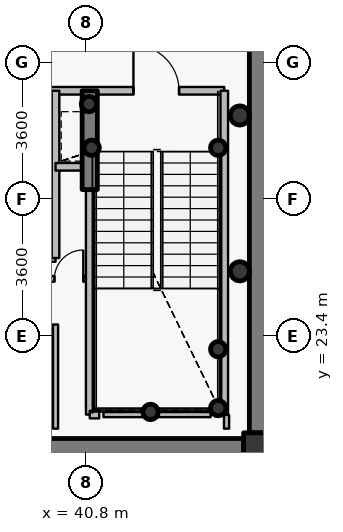
"""IFC4 building model, lengths in metres.
Left out: names, types, materials, properties, quantities, classifications, styles, units other than length and angle.
Written with IfcOpenShell. Run it as: python <this file> out.ifc"""

import sys

from ifc_helpers import new_model, si_unit, direction, frame, frame_2d, origin, origin_2d, place, context, subcontext, project, spatial, rectangle, hollow_circle, extrude, source, transform, mapped, element, fill, save


model = new_model("IFC4")
c1 = context("Model", 3, precision=1e-05, world=origin(), true_north=direction((0.0, 1.0)))
c2 = subcontext(c1, "Body", "Model", "MODEL_VIEW")
j1 = project(units=[si_unit("LENGTHUNIT", "METRE"), si_unit("PLANEANGLEUNIT", "RADIAN")], contexts=[c1])
p1 = place(None, origin())
s1 = spatial("IfcSite", under=j1, at=p1, CompositionType="ELEMENT")
p2 = place(p1, origin())
s2 = spatial("IfcBuilding", under=s1, at=p2, CompositionType="ELEMENT")
p3 = place(p2, frame((0.0, 0.0, 251.55)))
s3 = spatial("IfcBuildingStorey", under=s2, at=p3, CompositionType="ELEMENT", Elevation=251.55)
p4 = place(p3, frame((45.45, 20.35, 0.0), z_axis=(0.0, 0.0, 1.0), x_axis=(1.0, 0.0, 0.0)))
e1 = element("IfcColumn", 1, at=p4, inside=s3, PredefinedType="COLUMN", context=c2, shape_type="SweptSolid", body=[
    extrude(rectangle(XDim=1.0, YDim=1.0, at=origin_2d()), origin(), (0.0, 0.0, 1.0), 3.75),
])
for number, where, z_axis, x_axis in (
    (2, (44.28, 21.5, 0.0), (0.0, 0.0, 1.0), (1.0, 0.0, 0.0)),
    (3, (44.28, 23.05, 0.0), (0.0, 0.0, 1.0), (1.0, 0.0, 0.0)),
    (4, (42.5, 21.4, 0.0), (0.0, 0.0, 1.0), (1.0, 0.0, 0.0)),
    (5, (40.95, 28.35, 0.0), (0.0, 0.0, 1.0), (1.0, 0.0, 0.0)),
    (6, (44.28, 28.35, 0.0), (0.0, 0.0, 1.0), (1.0, 0.0, 0.0)),
    (7, (40.88, 29.5, 0.0), (0.0, 0.0, 1.0), (1.0, 0.0, 0.0)),
):
    element("IfcColumn", number, at=place(p3, frame(where, z_axis=z_axis, x_axis=x_axis)), inside=s3, PredefinedType="COLUMN", context=c2, shape_type="SweptSolid", body=[
        extrude(hollow_circle(Radius=0.203, WallThickness=0.016, at=origin_2d()), origin(), (0.0, 0.0, 1.0), 3.75),
    ])
p5 = place(p3, frame((45.45, 33.15, 0.0), z_axis=(0.0, 0.0, 1.0), x_axis=(0.0, -1.0, 0.0)))
e8 = element("IfcWall", 8, at=p5, inside=s3, PredefinedType="SHEAR", context=c2, shape_type="SweptSolid", body=[
    extrude(rectangle(XDim=12.3, YDim=0.7, at=frame_2d((6.15, 0.0))), origin(), (0.0, 0.0, 1.0), 3.05),
])
p6 = place(p3, frame((44.95, 20.35, 0.0), z_axis=(0.0, 0.0, 1.0), x_axis=(-1.0, 0.0, 0.0)))
e9 = element("IfcWall", 9, at=p6, inside=s3, PredefinedType="SHEAR", context=c2, shape_type="SweptSolid", body=[
    extrude(rectangle(XDim=17.9, YDim=0.7, at=frame_2d((8.95, 0.0))), origin(), (0.0, 0.0, 1.0), 3.05),
])
p7 = place(p6, frame((9.7, 0.0, 0.0)))
e10 = element("IfcOpeningElement", 10, at=p7, cuts=e9, PredefinedType="OPENING", context=c2, shape_type="SweptSolid", body=[
    extrude(rectangle(XDim=1.15, YDim=2.15, at=origin_2d()), frame((0.575, 0.36, 1.075), z_axis=(0.0, -1.0, 0.0), x_axis=(1.0, 0.0, 0.0)), (0.0, 0.0, 1.0), 0.72),
])
p8 = place(p3, frame((40.9, 27.25, 0.0), z_axis=(0.0, 0.0, 1.0), x_axis=(0.0, 1.0, 0.0)))
e11 = element("IfcWall", 11, at=p8, inside=s3, PredefinedType="SHEAR", context=c2, shape_type="SweptSolid", body=[
    extrude(rectangle(XDim=2.6, YDim=0.4, at=frame_2d((1.3, 0.0))), origin(), (0.0, 0.0, 1.0), 3.1),
])
for number, where, z_axis, x_axis in (
    (12, (44.85, 25.1, 0.0), (0.0, 0.0, 1.0), (1.0, 0.0, 0.0)),
    (13, (44.85, 29.2, 0.0), (0.0, 0.0, 1.0), (1.0, 0.0, 0.0)),
):
    element("IfcColumn", number, at=place(p3, frame(where, z_axis=z_axis, x_axis=x_axis)), inside=s3, PredefinedType="COLUMN", context=c2, shape_type="SweptSolid", body=[
        extrude(hollow_circle(Radius=0.254, WallThickness=0.02, at=origin_2d()), origin(), (0.0, 0.0, 1.0), 3.75),
    ])
p9 = place(p3, frame((35.05, 27.25, 0.0), z_axis=(0.0, 0.0, 1.0), x_axis=(1.0, 0.0, 0.0)))
e14 = element("IfcWall", 14, at=p9, inside=s3, PredefinedType="PARTITIONING", context=c2, shape_type="SweptSolid", body=[
    extrude(rectangle(XDim=4.95, YDim=0.2, at=frame_2d((2.475, 0.0))), origin(), (0.0, 0.0, 1.0), 3.085),
])
p10 = place(p3, frame((35.45, 25.45, 0.0), z_axis=(0.0, 0.0, 1.0), x_axis=(1.0, 0.0, 0.0)))
e15 = element("IfcWall", 15, at=p10, inside=s3, PredefinedType="PARTITIONING", context=c2, shape_type="SweptSolid", body=[
    extrude(rectangle(XDim=4.55, YDim=0.2, at=frame_2d((2.275, 0.0))), origin(), (0.0, 0.0, 1.0), 3.085),
])
p11 = place(p3, frame((35.95, 29.85, 0.0), z_axis=(0.0, 0.0, 1.0), x_axis=(1.0, 0.0, 0.0)))
e16 = element("IfcWall", 16, at=p11, inside=s3, PredefinedType="PARTITIONING", context=c2, shape_type="SweptSolid", body=[
    extrude(rectangle(XDim=8.49, YDim=0.2, at=frame_2d((4.245, 0.0))), origin(), (0.0, 0.0, 1.0), 3.085),
])
p12 = place(p11, frame((6.1, 0.0, 0.0)))
e17 = element("IfcOpeningElement", 17, at=p12, cuts=e16, PredefinedType="OPENING", context=c2, shape_type="SweptSolid", body=[
    extrude(rectangle(XDim=1.2, YDim=2.15, at=origin_2d()), frame((0.6, 0.11, 1.075), z_axis=(0.0, -1.0, 0.0), x_axis=(1.0, 0.0, 0.0)), (0.0, 0.0, 1.0), 0.22),
])
p13 = place(p11, frame((0.37, 0.0, 0.0)))
e18 = element("IfcOpeningElement", 18, at=p13, cuts=e16, PredefinedType="OPENING", context=c2, shape_type="SweptSolid", body=[
    extrude(rectangle(XDim=1.15, YDim=2.15, at=origin_2d()), frame((0.575, 0.11, 1.075), z_axis=(0.0, -1.0, 0.0), x_axis=(1.0, 0.0, 0.0)), (0.0, 0.0, 1.0), 0.22),
])
p14 = place(p11, frame((2.425, 0.0, 0.0)))
e19 = element("IfcOpeningElement", 19, at=p14, cuts=e16, PredefinedType="OPENING", context=c2, shape_type="SweptSolid", body=[
    extrude(rectangle(XDim=1.05, YDim=2.15, at=origin_2d()), frame((0.525, 0.11, 1.075), z_axis=(0.0, -1.0, 0.0), x_axis=(1.0, 0.0, 0.0)), (0.0, 0.0, 1.0), 0.22),
])
p15 = place(p3, frame((39.8, 24.9, 0.0), z_axis=(0.0, 0.0, 1.0), x_axis=(1.0, 0.0, 0.0)))
e20 = element("IfcWall", 20, at=p15, inside=s3, PredefinedType="PARTITIONING", context=c2, shape_type="SweptSolid", body=[
    extrude(rectangle(XDim=1.1, YDim=0.15, at=frame_2d((0.55, 0.0))), origin(), (0.0, 0.0, 1.0), 3.5),
])
p16 = place(p15, frame((0.17, 0.0, 0.0)))
e21 = element("IfcOpeningElement", 21, at=p16, cuts=e20, PredefinedType="OPENING", context=c2, shape_type="SweptSolid", body=[
    extrude(rectangle(XDim=0.76, YDim=2.1, at=origin_2d()), frame((0.38, 0.085, 1.05), z_axis=(0.0, -1.0, 0.0), x_axis=(1.0, 0.0, 0.0)), (0.0, 0.0, 1.0), 0.17),
])
p17 = place(p3, frame((40.0, 25.45, 0.0), z_axis=(0.0, 0.0, 1.0), x_axis=(0.0, 1.0, 0.0)))
e22 = element("IfcWall", 22, at=p17, inside=s3, PredefinedType="PARTITIONING", context=c2, shape_type="SweptSolid", body=[
    extrude(rectangle(XDim=4.4, YDim=0.2, at=frame_2d((2.2, 0.0))), origin(), (0.0, 0.0, 1.0), 3.5),
])
p18 = place(p3, frame((40.0, 27.85, 0.0), z_axis=(0.0, 0.0, 1.0), x_axis=(1.0, 0.0, 0.0)))
e23 = element("IfcWall", 23, at=p18, inside=s3, PredefinedType="PARTITIONING", context=c2, shape_type="SweptSolid", body=[
    extrude(rectangle(XDim=0.9, YDim=0.2, at=frame_2d((0.45, 0.0))), origin(), (0.0, 0.0, 1.0), 3.5),
])
p19 = place(p3, frame((40.9, 21.33, 0.0), z_axis=(0.0, 0.0, 1.0), x_axis=(0.0, 1.0, 0.0)))
e24 = element("IfcWall", 24, at=p19, inside=s3, PredefinedType="PARTITIONING", context=c2, shape_type="SweptSolid", body=[
    extrude(rectangle(XDim=5.91, YDim=0.2, at=frame_2d((2.955, 0.0))), origin(), (0.0, 0.0, 1.0), 3.035),
])
p20 = place(p3, frame((40.9, 21.33, 0.0), z_axis=(0.0, 0.0, 1.0), x_axis=(1.0, 0.0, 0.0)))
e25 = element("IfcWall", 25, at=p20, inside=s3, PredefinedType="PARTITIONING", context=c2, shape_type="SweptSolid", body=[
    extrude(rectangle(XDim=0.25, YDim=0.2, at=frame_2d((0.125, 0.0))), origin(), (0.0, 0.0, 1.0), 3.035),
])
p21 = place(p3, frame((44.44, 21.33, 0.0), z_axis=(0.0, 0.0, 1.0), x_axis=(0.0, 1.0, 0.0)))
e26 = element("IfcWall", 26, at=p21, inside=s3, PredefinedType="PARTITIONING", context=c2, shape_type="SweptSolid", body=[
    extrude(rectangle(XDim=8.52, YDim=0.2, at=frame_2d((4.26, 0.0))), origin(), (0.0, 0.0, 1.0), 3.5),
])
p22 = place(p3, frame((44.08, 21.33, 0.0), z_axis=(0.0, 0.0, 1.0), x_axis=(-1.0, 0.0, 0.0)))
e27 = element("IfcWall", 27, at=p22, inside=s3, PredefinedType="PARTITIONING", context=c2, shape_type="SweptSolid", body=[
    extrude(rectangle(XDim=2.82, YDim=0.135, at=frame_2d((1.41, 0.0))), origin(), (0.0, 0.0, 1.0), 3.035),
])
p23 = place(p3, frame((40.0, 23.7, 0.0), z_axis=(0.0, 0.0, 1.0), x_axis=(0.0, -1.0, 0.0)))
e28 = element("IfcWall", 28, at=p23, inside=s3, PredefinedType="PARTITIONING", context=c2, shape_type="SweptSolid", body=[
    extrude(rectangle(XDim=2.74, YDim=0.135, at=frame_2d((1.37, 0.0))), origin(), (0.0, 0.0, 1.0), 3.035),
])
p24 = place(p3, frame((44.5, 20.96, 0.0), z_axis=(0.0, 0.0, 1.0), x_axis=(0.0, 1.0, 0.0)))
e29 = element("IfcWall", 29, at=p24, inside=s3, PredefinedType="PARTITIONING", context=c2, shape_type="SweptSolid", body=[
    extrude(rectangle(XDim=0.36, YDim=0.135, at=frame_2d((0.18, 0.0))), origin(), (0.0, 0.0, 1.0), 3.5),
])
m1 = source(origin(), c2, "Body", "SweptSolid", [
    extrude(rectangle(XDim=1.2, YDim=2.15, at=origin_2d()), frame((0.6, 0.025, 1.075), z_axis=(0.0, -1.0, 0.0), x_axis=(1.0, 0.0, 0.0)), (0.0, 0.0, 1.0), 0.05),
])
p25 = place(p12, origin())
e30 = element("IfcDoor", 30, at=p25, inside=s3, OperationType="SINGLE_SWING_LEFT", PredefinedType="DOOR", context=c2, shape_type="MappedRepresentation", body=[
    mapped(m1, transform((0.0, 0.0, 0.0), x_axis=(1.0, 0.0, 0.0), y_axis=(0.0, 1.0, 0.0), z_axis=(0.0, 0.0, 1.0), scale=1.0)),
])
fill(e17, e30)
m2 = source(origin(), c2, "Body", "SweptSolid", [
    extrude(rectangle(XDim=0.76, YDim=2.1, at=origin_2d()), frame((0.38, 0.025, 1.05), z_axis=(0.0, -1.0, 0.0), x_axis=(1.0, 0.0, 0.0)), (0.0, 0.0, 1.0), 0.05),
])
p26 = place(p16, origin())
e31 = element("IfcDoor", 31, at=p26, inside=s3, OperationType="SINGLE_SWING_RIGHT", PredefinedType="DOOR", context=c2, shape_type="MappedRepresentation", body=[
    mapped(m2, transform((0.0, 0.0, 0.0), x_axis=(1.0, 0.0, 0.0), y_axis=(0.0, 1.0, 0.0), z_axis=(0.0, 0.0, 1.0), scale=1.0)),
])
fill(e21, e31)
save(model, sys.argv[1])
